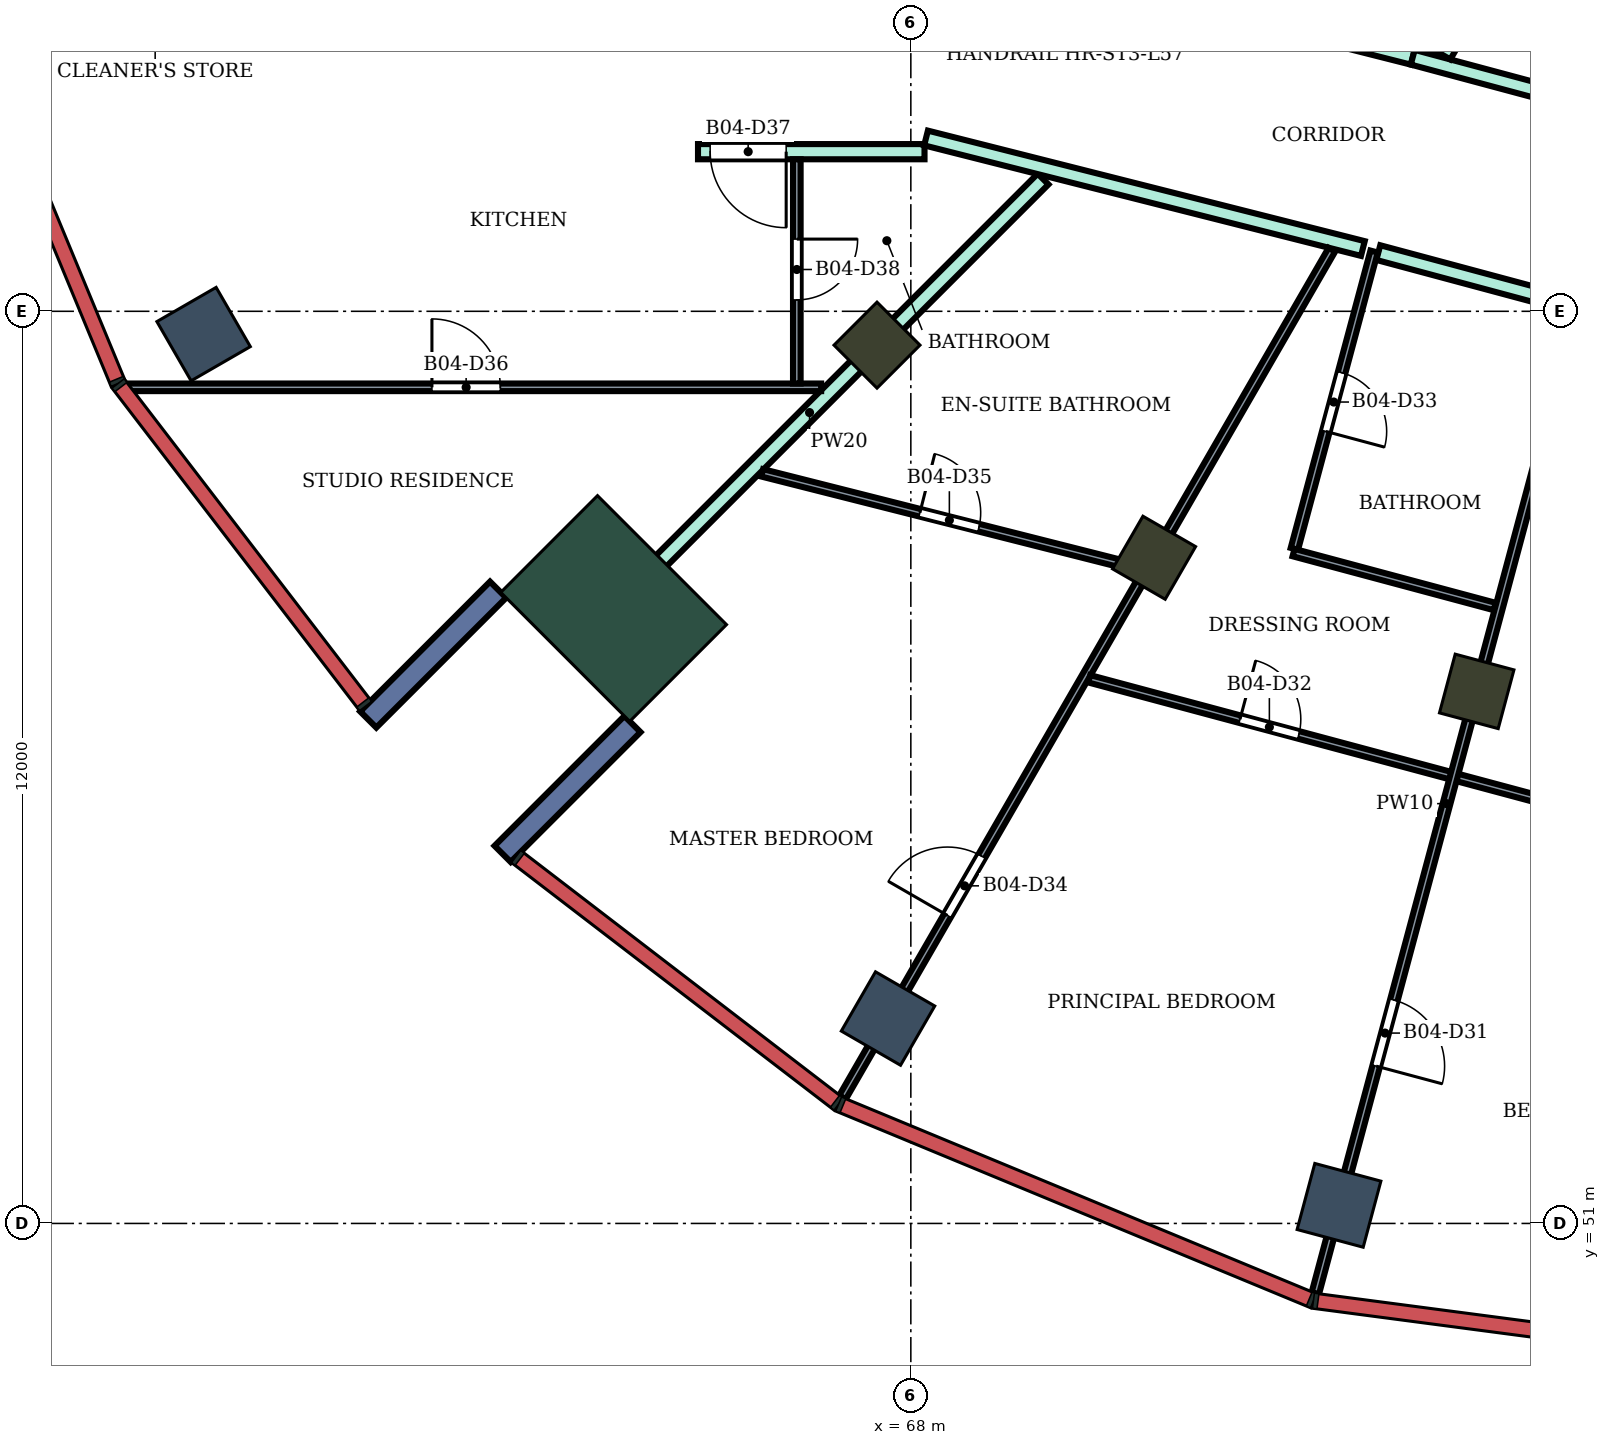
"""IFC4 building model, lengths in metres.
Left out: names, types, materials, properties, quantities, classifications, styles, units other than length and angle.
Written with IfcOpenShell. Run it as: python <this file> out.ifc"""

import sys

from ifc_helpers import new_model, si_unit, direction, frame, frame_2d, origin, origin_2d, place, context, subcontext, project, spatial, rectangle, extrude, element, fill, save


model = new_model("IFC4")
c1 = context("Model", 3, precision=1e-05, world=origin(), true_north=direction((0.0, 1.0)))
c2 = subcontext(c1, "Body", "Model", "MODEL_VIEW")
j1 = project(units=[si_unit("LENGTHUNIT", "METRE"), si_unit("PLANEANGLEUNIT", "RADIAN")], contexts=[c1])
p1 = place(None, origin())
s1 = spatial("IfcSite", under=j1, at=p1, CompositionType="ELEMENT")
p2 = place(p1, origin())
s2 = spatial("IfcBuilding", under=s1, at=p2, CompositionType="ELEMENT")
p3 = place(p2, frame((0.0, 0.0, 249.9)))
s3 = spatial("IfcBuildingStorey", under=s2, at=p3, CompositionType="ELEMENT", Elevation=249.9)
for number, where, z_axis, x_axis in (
    (1, (58.696, 62.7, 0.0), (0.0, 0.0, 1.0), (-0.866, -0.5, 0.0)),
    (2, (67.7, 53.696, 0.0), (0.0, 0.0, 1.0), (-0.5, -0.866, 0.0)),
    (3, (73.633, 51.238, 0.0), (0.0, 0.0, 1.0), (-0.259, -0.966, 0.0)),
):
    element("IfcColumn", number, at=place(p3, frame(where, z_axis=z_axis, x_axis=x_axis)), inside=s3, PredefinedType="COLUMN", context=c2, shape_type="SweptSolid", body=[
        extrude(rectangle(XDim=0.9, YDim=0.9, at=origin_2d()), origin(), (0.0, 0.0, 1.0), 4.2),
    ])
for number, where, z_axis, x_axis in (
    (4, (67.555, 62.555, 0.0), (0.0, 0.0, 1.0), (-0.707, -0.707, 0.0)),
    (5, (71.2, 59.758, 0.0), (0.0, 0.0, 1.0), (-0.5, -0.866, 0.0)),
    (6, (75.445, 58.0, 0.0), (0.0, 0.0, 1.0), (-0.259, -0.966, 0.0)),
):
    element("IfcColumn", number, at=place(p3, frame(where, z_axis=z_axis, x_axis=x_axis)), inside=s3, PredefinedType="COLUMN", context=c2, shape_type="SweptSolid", body=[
        extrude(rectangle(XDim=0.8, YDim=0.8, at=origin_2d()), origin(), (0.0, 0.0, 1.0), 4.2),
    ])
p4 = place(p3, frame((64.09, 59.09, 0.0), z_axis=(0.0, 0.0, 1.0), x_axis=(-0.707106781187, -0.707106781187, 0.0)))
e7 = element("IfcColumn", 7, at=p4, inside=s3, PredefinedType="COLUMN", context=c2, shape_type="SweptSolid", body=[
    extrude(rectangle(XDim=1.8, YDim=2.4, at=origin_2d()), origin(), (0.0, 0.0, 1.0), 4.2),
])
for number, where, z_axis, x_axis in (
    (8, (62.57, 59.338, 0.0), (0.0, 0.0, 1.0), (-0.707, -0.707, 0.0)),
    (9, (64.338, 57.57, 0.0), (0.0, 0.0, 1.0), (-0.707, -0.707, 0.0)),
):
    element("IfcWall", number, at=place(p3, frame(where, z_axis=z_axis, x_axis=x_axis)), inside=s3, PredefinedType="NOTDEFINED", context=c2, shape_type="SweptSolid", body=[
        extrude(rectangle(XDim=2.416, YDim=0.3, at=frame_2d((1.208, 0.0))), origin(), (0.0, 0.0, 1.0), 4.2),
    ])
p5 = place(p3, frame((63.596, 58.596, 0.0), z_axis=(0.0, 0.0, 1.0), x_axis=(0.707106781187, 0.707106781187, 0.0)))
e10 = element("IfcWall", 10, at=p5, inside=s3, PredefinedType="PARTITIONING", context=c2, shape_type="SweptSolid", body=[
    extrude(rectangle(XDim=8.689, YDim=0.2, at=frame_2d((4.344, 0.0))), origin(), (0.0, 0.0, 1.0), 3.75),
])
p6 = place(p3, frame((65.2, 65.1, 0.0), z_axis=(0.0, 0.0, 1.0), x_axis=(1.0, 0.0, 0.0)))
e11 = element("IfcWall", 11, at=p6, inside=s3, PredefinedType="PARTITIONING", context=c2, shape_type="SweptSolid", body=[
    extrude(rectangle(XDim=2.98, YDim=0.2, at=frame_2d((1.49, 0.0))), origin(), (0.0, 0.0, 1.0), 3.75),
])
p7 = place(p6, frame((0.16, 0.0, 0.0)))
e12 = element("IfcOpeningElement", 12, at=p7, cuts=e11, PredefinedType="OPENING", context=c2, shape_type="SweptSolid", body=[
    extrude(rectangle(XDim=1.0, YDim=2.1, at=frame_2d((0.5, 1.05))), frame((0.0, 0.11, 0.0), z_axis=(0.0, -1.0, 0.0), x_axis=(1.0, 0.0, 0.0)), (0.0, 0.0, 1.0), 0.22),
])
p8 = place(p3, frame((68.2, 65.28, 0.0), z_axis=(0.0, 0.0, 1.0), x_axis=(0.969450596516, -0.245286650503, 0.0)))
e13 = element("IfcWall", 13, at=p8, inside=s3, PredefinedType="PARTITIONING", context=c2, shape_type="SweptSolid", body=[
    extrude(rectangle(XDim=5.928, YDim=0.2, at=frame_2d((2.964, 0.0))), origin(), (0.0, 0.0, 1.0), 3.75),
])
p9 = place(p3, frame((72.1, 66.975, 0.0), z_axis=(0.0, 0.0, 1.0), x_axis=(0.969471314457, -0.245204752086, 0.0)))
e14 = element("IfcWall", 14, at=p9, inside=s3, PredefinedType="PARTITIONING", context=c2, shape_type="SweptSolid", body=[
    extrude(rectangle(XDim=2.582, YDim=0.2, at=frame_2d((1.291, 0.0))), origin(), (0.0, 0.0, 1.0), 3.75),
])
p10 = place(p9, frame((0.841, 0.0, 0.0)))
e15 = element("IfcOpeningElement", 15, at=p10, cuts=e14, PredefinedType="OPENING", context=c2, shape_type="SweptSolid", body=[
    extrude(rectangle(XDim=0.9, YDim=2.1, at=frame_2d((0.45, 1.05))), frame((0.0, 0.11, 0.0), z_axis=(0.0, -1.0, 0.0), x_axis=(1.0, 0.0, 0.0)), (0.0, 0.0, 1.0), 0.22),
])
p11 = place(p3, frame((74.15, 63.772, 0.0), z_axis=(0.0, 0.0, 1.0), x_axis=(0.965801140662, -0.259283930655, 0.0)))
e16 = element("IfcWall", 16, at=p11, inside=s3, PredefinedType="PARTITIONING", context=c2, shape_type="SweptSolid", body=[
    extrude(rectangle(XDim=6.006, YDim=0.2, at=frame_2d((3.003, 0.0))), origin(), (0.0, 0.0, 1.0), 3.75),
])
p12 = place(p3, frame((74.603, 66.342, 0.0), z_axis=(0.0, 0.0, 1.0), x_axis=(0.965895298152, -0.258932950796, 0.0)))
e17 = element("IfcWall", 17, at=p12, inside=s3, PredefinedType="PARTITIONING", context=c2, shape_type="SweptSolid", body=[
    extrude(rectangle(XDim=5.538, YDim=0.2, at=frame_2d((2.769, 0.0))), origin(), (0.0, 0.0, 1.0), 3.75),
])
p13 = place(p12, frame((2.062, 0.0, 0.0)))
e18 = element("IfcOpeningElement", 18, at=p13, cuts=e17, PredefinedType="OPENING", context=c2, shape_type="SweptSolid", body=[
    extrude(rectangle(XDim=1.8, YDim=2.1, at=frame_2d((0.9, 1.05))), frame((0.0, 0.11, 0.0), z_axis=(0.0, -1.0, 0.0), x_axis=(1.0, 0.0, 0.0)), (0.0, 0.0, 1.0), 0.22),
])
p14 = place(p3, frame((75.011, 66.364, 0.0), z_axis=(0.0, 0.0, 1.0), x_axis=(0.500121996664, 0.86595495752, 0.0)))
e19 = element("IfcWall", 19, at=p14, inside=s3, PredefinedType="PARTITIONING", context=c2, shape_type="SweptSolid", body=[
    extrude(rectangle(XDim=2.274, YDim=0.2, at=frame_2d((1.137, 0.0))), origin(), (0.0, 0.0, 1.0), 3.75),
])
p15 = place(p3, frame((57.668, 62.0, 0.0), z_axis=(0.0, 0.0, 1.0), x_axis=(1.0, 0.0, 0.0)))
e20 = element("IfcWall", 20, at=p15, inside=s3, PredefinedType="PARTITIONING", context=c2, shape_type="SweptSolid", body=[
    extrude(rectangle(XDim=9.152, YDim=0.1, at=frame_2d((4.576, 0.0))), origin(), (0.0, 0.0, 1.0), 3.75),
])
p16 = place(p15, frame((4.031, 0.0, 0.0)))
e21 = element("IfcOpeningElement", 21, at=p16, cuts=e20, PredefinedType="OPENING", context=c2, shape_type="SweptSolid", body=[
    extrude(rectangle(XDim=0.9, YDim=2.1, at=frame_2d((0.45, 1.05))), frame((0.0, 0.06, 0.0), z_axis=(0.0, -1.0, 0.0), x_axis=(1.0, 0.0, 0.0)), (0.0, 0.0, 1.0), 0.12),
])
p17 = place(p3, frame((66.045, 60.875, 0.0), z_axis=(0.0, 0.0, 1.0), x_axis=(0.969437033678, -0.245340248908, 0.0)))
e22 = element("IfcWall", 22, at=p17, inside=s3, PredefinedType="PARTITIONING", context=c2, shape_type="SweptSolid", body=[
    extrude(rectangle(XDim=5.16, YDim=0.1, at=frame_2d((2.58, 0.0))), origin(), (0.0, 0.0, 1.0), 3.75),
])
p18 = place(p17, frame((2.14, 0.0, 0.0)))
e23 = element("IfcOpeningElement", 23, at=p18, cuts=e22, PredefinedType="OPENING", context=c2, shape_type="SweptSolid", body=[
    extrude(rectangle(XDim=0.8, YDim=2.1, at=frame_2d((0.4, 1.05))), frame((0.0, 0.06, 0.0), z_axis=(0.0, -1.0, 0.0), x_axis=(1.0, 0.0, 0.0)), (0.0, 0.0, 1.0), 0.12),
])
p19 = place(p3, frame((66.5, 62.05, 0.0), z_axis=(0.0, 0.0, 1.0), x_axis=(0.0, 1.0, 0.0)))
e24 = element("IfcWall", 24, at=p19, inside=s3, PredefinedType="PARTITIONING", context=c2, shape_type="SweptSolid", body=[
    extrude(rectangle(XDim=2.95, YDim=0.1, at=frame_2d((1.475, 0.0))), origin(), (0.0, 0.0, 1.0), 3.75),
])
p20 = place(p19, frame((1.1, 0.0, 0.0)))
e25 = element("IfcOpeningElement", 25, at=p20, cuts=e24, PredefinedType="OPENING", context=c2, shape_type="SweptSolid", body=[
    extrude(rectangle(XDim=0.8, YDim=2.1, at=frame_2d((0.4, 1.05))), frame((0.0, 0.06, 0.0), z_axis=(0.0, -1.0, 0.0), x_axis=(1.0, 0.0, 0.0)), (0.0, 0.0, 1.0), 0.12),
])
p21 = place(p3, frame((67.101, 52.659, 0.0), z_axis=(0.0, 0.0, 1.0), x_axis=(0.499999276258, 0.866025821636, 0.0)))
e26 = element("IfcWall", 26, at=p21, inside=s3, PredefinedType="PARTITIONING", context=c2, shape_type="SweptSolid", body=[
    extrude(rectangle(XDim=12.876, YDim=0.1, at=frame_2d((6.438, 0.0))), origin(), (0.0, 0.0, 1.0), 3.75),
])
p22 = place(p21, frame((2.763, 0.0, 0.0)))
e27 = element("IfcOpeningElement", 27, at=p22, cuts=e26, PredefinedType="OPENING", context=c2, shape_type="SweptSolid", body=[
    extrude(rectangle(XDim=0.9, YDim=2.1, at=frame_2d((0.45, 1.05))), frame((0.0, 0.06, 0.0), z_axis=(0.0, -1.0, 0.0), x_axis=(1.0, 0.0, 0.0)), (0.0, 0.0, 1.0), 0.12),
])
p23 = place(p3, frame((70.347, 58.165, 0.0), z_axis=(0.0, 0.0, 1.0), x_axis=(0.965891429463, -0.2589473817, 0.0)))
e28 = element("IfcWall", 28, at=p23, inside=s3, PredefinedType="PARTITIONING", context=c2, shape_type="SweptSolid", body=[
    extrude(rectangle(XDim=9.934, YDim=0.1, at=frame_2d((4.967, 0.0))), origin(), (0.0, 0.0, 1.0), 3.75),
])
p24 = place(p23, frame((7.081, 0.0, 0.0)))
e29 = element("IfcOpeningElement", 29, at=p24, cuts=e28, PredefinedType="OPENING", context=c2, shape_type="SweptSolid", body=[
    extrude(rectangle(XDim=0.8, YDim=2.1, at=frame_2d((0.4, 1.05))), frame((0.0, 0.06, 0.0), z_axis=(0.0, -1.0, 0.0), x_axis=(1.0, 0.0, 0.0)), (0.0, 0.0, 1.0), 0.12),
])
p25 = place(p23, frame((2.054, 0.0, 0.0)))
e30 = element("IfcOpeningElement", 30, at=p25, cuts=e28, PredefinedType="OPENING", context=c2, shape_type="SweptSolid", body=[
    extrude(rectangle(XDim=0.8, YDim=2.1, at=frame_2d((0.4, 1.05))), frame((0.0, 0.06, 0.0), z_axis=(0.0, -1.0, 0.0), x_axis=(1.0, 0.0, 0.0)), (0.0, 0.0, 1.0), 0.12),
])
p26 = place(p3, frame((73.046, 59.875, 0.0), z_axis=(0.0, 0.0, 1.0), x_axis=(0.258983170584, 0.965881834053, 0.0)))
e31 = element("IfcWall", 31, at=p26, inside=s3, PredefinedType="PARTITIONING", context=c2, shape_type="SweptSolid", body=[
    extrude(rectangle(XDim=4.05, YDim=0.1, at=frame_2d((2.025, 0.0))), origin(), (0.0, 0.0, 1.0), 3.75),
])
p27 = place(p26, frame((1.6, 0.0, 0.0)))
e32 = element("IfcOpeningElement", 32, at=p27, cuts=e31, PredefinedType="OPENING", context=c2, shape_type="SweptSolid", body=[
    extrude(rectangle(XDim=0.8, YDim=2.1, at=frame_2d((0.4, 1.05))), frame((0.0, 0.06, 0.0), z_axis=(0.0, -1.0, 0.0), x_axis=(1.0, 0.0, 0.0)), (0.0, 0.0, 1.0), 0.12),
])
p28 = place(p3, frame((73.035, 59.826, 0.0), z_axis=(0.0, 0.0, 1.0), x_axis=(0.965905892915, -0.258893426011, 0.0)))
e33 = element("IfcWall", 33, at=p28, inside=s3, PredefinedType="PARTITIONING", context=c2, shape_type="SweptSolid", body=[
    extrude(rectangle(XDim=2.74, YDim=0.1, at=frame_2d((1.37, 0.0))), origin(), (0.0, 0.0, 1.0), 3.75),
])
p29 = place(p3, frame((73.322, 50.081, 0.0), z_axis=(0.0, 0.0, 1.0), x_axis=(0.258871185824, 0.965911853717, 0.0)))
e34 = element("IfcWall", 34, at=p29, inside=s3, PredefinedType="PARTITIONING", context=c2, shape_type="SweptSolid", body=[
    extrude(rectangle(XDim=13.338, YDim=0.1, at=frame_2d((6.669, 0.0))), origin(), (0.0, 0.0, 1.0), 3.75),
])
p30 = place(p29, frame((3.094, 0.0, 0.0)))
e35 = element("IfcOpeningElement", 35, at=p30, cuts=e34, PredefinedType="OPENING", context=c2, shape_type="SweptSolid", body=[
    extrude(rectangle(XDim=0.9, YDim=2.1, at=frame_2d((0.45, 1.05))), frame((0.0, 0.06, 0.0), z_axis=(0.0, -1.0, 0.0), x_axis=(1.0, 0.0, 0.0)), (0.0, 0.0, 1.0), 0.12),
])
p31 = place(p30, frame((0.9, 0.0, 0.0), z_axis=(0.0, 0.0, 1.0), x_axis=(-1.0, 0.0, 0.0)))
e36 = element("IfcDoor", 36, at=p31, inside=s3, OperationType="SINGLE_SWING_RIGHT", PredefinedType="DOOR", context=c2, shape_type="SweptSolid", body=[
    extrude(rectangle(XDim=0.9, YDim=2.1, at=frame_2d((0.45, 1.05))), frame((0.0, 0.025, 0.0), z_axis=(0.0, -1.0, 0.0), x_axis=(1.0, 0.0, 0.0)), (0.0, 0.0, 1.0), 0.05),
])
fill(e35, e36)
p32 = place(p25, origin())
e37 = element("IfcDoor", 37, at=p32, inside=s3, OperationType="SINGLE_SWING_LEFT", PredefinedType="DOOR", context=c2, shape_type="SweptSolid", body=[
    extrude(rectangle(XDim=0.8, YDim=2.1, at=frame_2d((0.4, 1.05))), frame((0.0, 0.025, 0.0), z_axis=(0.0, -1.0, 0.0), x_axis=(1.0, 0.0, 0.0)), (0.0, 0.0, 1.0), 0.05),
])
fill(e30, e37)
p33 = place(p27, frame((0.8, 0.0, 0.0), z_axis=(0.0, 0.0, 1.0), x_axis=(-1.0, 0.0, 0.0)))
e38 = element("IfcDoor", 38, at=p33, inside=s3, OperationType="SINGLE_SWING_RIGHT", PredefinedType="DOOR", context=c2, shape_type="SweptSolid", body=[
    extrude(rectangle(XDim=0.8, YDim=2.1, at=frame_2d((0.4, 1.05))), frame((0.0, 0.025, 0.0), z_axis=(0.0, -1.0, 0.0), x_axis=(1.0, 0.0, 0.0)), (0.0, 0.0, 1.0), 0.05),
])
fill(e32, e38)
p34 = place(p22, origin())
e39 = element("IfcDoor", 39, at=p34, inside=s3, OperationType="SINGLE_SWING_LEFT", PredefinedType="DOOR", context=c2, shape_type="SweptSolid", body=[
    extrude(rectangle(XDim=0.9, YDim=2.1, at=frame_2d((0.45, 1.05))), frame((0.0, 0.025, 0.0), z_axis=(0.0, -1.0, 0.0), x_axis=(1.0, 0.0, 0.0)), (0.0, 0.0, 1.0), 0.05),
])
fill(e27, e39)
p35 = place(p18, origin())
e40 = element("IfcDoor", 40, at=p35, inside=s3, OperationType="SINGLE_SWING_LEFT", PredefinedType="DOOR", context=c2, shape_type="SweptSolid", body=[
    extrude(rectangle(XDim=0.8, YDim=2.1, at=frame_2d((0.4, 1.05))), frame((0.0, 0.025, 0.0), z_axis=(0.0, -1.0, 0.0), x_axis=(1.0, 0.0, 0.0)), (0.0, 0.0, 1.0), 0.05),
])
fill(e23, e40)
p36 = place(p16, origin())
e41 = element("IfcDoor", 41, at=p36, inside=s3, OperationType="SINGLE_SWING_LEFT", PredefinedType="DOOR", context=c2, shape_type="SweptSolid", body=[
    extrude(rectangle(XDim=0.9, YDim=2.1, at=frame_2d((0.45, 1.05))), frame((0.0, 0.025, 0.0), z_axis=(0.0, -1.0, 0.0), x_axis=(1.0, 0.0, 0.0)), (0.0, 0.0, 1.0), 0.05),
])
fill(e21, e41)
p37 = place(p7, frame((1.0, 0.0, 0.0), z_axis=(0.0, 0.0, 1.0), x_axis=(-1.0, 0.0, 0.0)))
e42 = element("IfcDoor", 42, at=p37, inside=s3, OperationType="SINGLE_SWING_LEFT", PredefinedType="DOOR", context=c2, shape_type="SweptSolid", body=[
    extrude(rectangle(XDim=1.0, YDim=2.1, at=frame_2d((0.5, 1.05))), frame((0.0, 0.025, 0.0), z_axis=(0.0, -1.0, 0.0), x_axis=(1.0, 0.0, 0.0)), (0.0, 0.0, 1.0), 0.05),
])
fill(e12, e42)
p38 = place(p20, frame((0.8, 0.0, 0.0), z_axis=(0.0, 0.0, 1.0), x_axis=(-1.0, 0.0, 0.0)))
e43 = element("IfcDoor", 43, at=p38, inside=s3, OperationType="SINGLE_SWING_LEFT", PredefinedType="DOOR", context=c2, shape_type="SweptSolid", body=[
    extrude(rectangle(XDim=0.8, YDim=2.1, at=frame_2d((0.4, 1.05))), frame((0.0, 0.025, 0.0), z_axis=(0.0, -1.0, 0.0), x_axis=(1.0, 0.0, 0.0)), (0.0, 0.0, 1.0), 0.05),
])
fill(e25, e43)
save(model, sys.argv[1])
